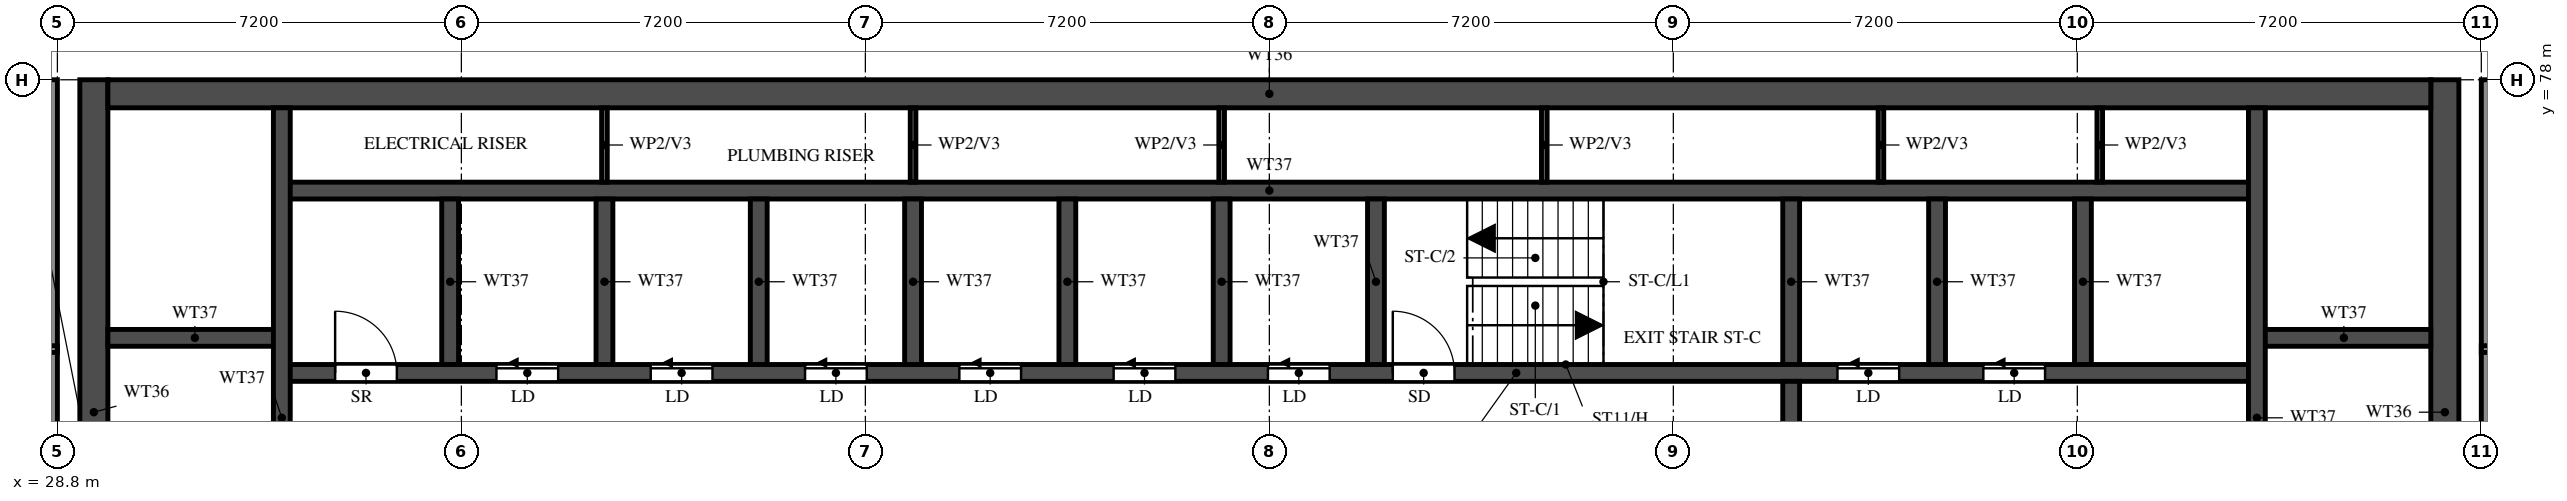
"""IFC4 building model, lengths in metres.
Left out: names, types, materials, properties, quantities, classifications, styles, units other than length and angle.
Written with IfcOpenShell. Run it as: python <this file> out.ifc"""

import sys

from ifc_helpers import new_model, si_unit, direction, frame, frame_2d, origin, place, context, subcontext, project, spatial, rectangle, extrude, element, fill, save


model = new_model("IFC4")
c1 = context("Model", 3, precision=1e-05, world=origin(), true_north=direction((0.0, 1.0)))
c2 = subcontext(c1, "Body", "Model", "MODEL_VIEW")
j1 = project(units=[si_unit("LENGTHUNIT", "METRE"), si_unit("PLANEANGLEUNIT", "RADIAN")], contexts=[c1])
p1 = place(None, origin())
s1 = spatial("IfcSite", under=j1, at=p1, CompositionType="ELEMENT")
p2 = place(p1, origin())
s2 = spatial("IfcBuilding", under=s1, at=p2, CompositionType="ELEMENT")
p3 = place(p2, frame((0.0, 0.0, 232.5)))
s3 = spatial("IfcBuildingStorey", under=s2, at=p3, CompositionType="ELEMENT", Elevation=232.5)
for number, where, z_axis, x_axis in (
    (1, (29.45, 66.15, 0.0), (0.0, 0.0, 1.0), (0.0, 1.0, 0.0)),
    (2, (71.35, 66.15, 0.0), (0.0, 0.0, 1.0), (0.0, 1.0, 0.0)),
):
    element("IfcWall", number, at=place(p3, frame(where, z_axis=z_axis, x_axis=x_axis)), inside=s3, PredefinedType="SHEAR", context=c2, shape_type="SweptSolid", body=[
        extrude(rectangle(XDim=11.85, YDim=0.5, at=frame_2d((5.925, 0.0))), origin(), (0.0, 0.0, 1.0), 3.22),
    ])
p4 = place(p3, frame((29.7, 77.75, 0.0), z_axis=(0.0, 0.0, 1.0), x_axis=(1.0, 0.0, 0.0)))
e3 = element("IfcWall", 3, at=p4, inside=s3, PredefinedType="SHEAR", context=c2, shape_type="SweptSolid", body=[
    extrude(rectangle(XDim=41.4, YDim=0.5, at=frame_2d((20.7, 0.0))), origin(), (0.0, 0.0, 1.0), 3.22),
])
p5 = place(p3, frame((32.8, 72.775, 0.0), z_axis=(0.0, 0.0, 1.0), x_axis=(1.0, 0.0, 0.0)))
e4 = element("IfcWall", 4, at=p5, inside=s3, PredefinedType="SHEAR", context=c2, shape_type="SweptSolid", body=[
    extrude(rectangle(XDim=35.2, YDim=0.3, at=frame_2d((17.6, 0.0))), origin(), (0.0, 0.0, 1.0), 3.22),
])
p6 = place(p5, frame((19.8, 0.0, 0.0)))
e5 = element("IfcOpeningElement", 5, at=p6, cuts=e4, PredefinedType="OPENING", context=c2, shape_type="SweptSolid", body=[
    extrude(rectangle(XDim=1.1, YDim=2.1, at=frame_2d((0.55, 1.05))), frame((0.0, 0.16, 0.0), z_axis=(0.0, -1.0, 0.0), x_axis=(1.0, 0.0, 0.0)), (0.0, 0.0, 1.0), 0.32),
])
p7 = place(p5, frame((27.725, 0.0, 0.0)))
e6 = element("IfcOpeningElement", 6, at=p7, cuts=e4, PredefinedType="OPENING", context=c2, shape_type="SweptSolid", body=[
    extrude(rectangle(XDim=1.1, YDim=2.1, at=frame_2d((0.55, 1.05))), frame((0.0, 0.16, 0.0), z_axis=(0.0, -1.0, 0.0), x_axis=(1.0, 0.0, 0.0)), (0.0, 0.0, 1.0), 0.32),
])
p8 = place(p5, frame((30.325, 0.0, 0.0)))
e7 = element("IfcOpeningElement", 7, at=p8, cuts=e4, PredefinedType="OPENING", context=c2, shape_type="SweptSolid", body=[
    extrude(rectangle(XDim=1.1, YDim=2.1, at=frame_2d((0.55, 1.05))), frame((0.0, 0.16, 0.0), z_axis=(0.0, -1.0, 0.0), x_axis=(1.0, 0.0, 0.0)), (0.0, 0.0, 1.0), 0.32),
])
p9 = place(p5, frame((3.825, 0.0, 0.0)))
e8 = element("IfcOpeningElement", 8, at=p9, cuts=e4, PredefinedType="OPENING", context=c2, shape_type="SweptSolid", body=[
    extrude(rectangle(XDim=1.1, YDim=2.1, at=frame_2d((0.55, 1.05))), frame((0.0, 0.16, 0.0), z_axis=(0.0, -1.0, 0.0), x_axis=(1.0, 0.0, 0.0)), (0.0, 0.0, 1.0), 0.32),
])
p10 = place(p5, frame((6.575, 0.0, 0.0)))
e9 = element("IfcOpeningElement", 9, at=p10, cuts=e4, PredefinedType="OPENING", context=c2, shape_type="SweptSolid", body=[
    extrude(rectangle(XDim=1.1, YDim=2.1, at=frame_2d((0.55, 1.05))), frame((0.0, 0.16, 0.0), z_axis=(0.0, -1.0, 0.0), x_axis=(1.0, 0.0, 0.0)), (0.0, 0.0, 1.0), 0.32),
])
p11 = place(p5, frame((9.325, 0.0, 0.0)))
e10 = element("IfcOpeningElement", 10, at=p11, cuts=e4, PredefinedType="OPENING", context=c2, shape_type="SweptSolid", body=[
    extrude(rectangle(XDim=1.1, YDim=2.1, at=frame_2d((0.55, 1.05))), frame((0.0, 0.16, 0.0), z_axis=(0.0, -1.0, 0.0), x_axis=(1.0, 0.0, 0.0)), (0.0, 0.0, 1.0), 0.32),
])
p12 = place(p5, frame((12.075, 0.0, 0.0)))
e11 = element("IfcOpeningElement", 11, at=p12, cuts=e4, PredefinedType="OPENING", context=c2, shape_type="SweptSolid", body=[
    extrude(rectangle(XDim=1.1, YDim=2.1, at=frame_2d((0.55, 1.05))), frame((0.0, 0.16, 0.0), z_axis=(0.0, -1.0, 0.0), x_axis=(1.0, 0.0, 0.0)), (0.0, 0.0, 1.0), 0.32),
])
p13 = place(p5, frame((14.825, 0.0, 0.0)))
e12 = element("IfcOpeningElement", 12, at=p13, cuts=e4, PredefinedType="OPENING", context=c2, shape_type="SweptSolid", body=[
    extrude(rectangle(XDim=1.1, YDim=2.1, at=frame_2d((0.55, 1.05))), frame((0.0, 0.16, 0.0), z_axis=(0.0, -1.0, 0.0), x_axis=(1.0, 0.0, 0.0)), (0.0, 0.0, 1.0), 0.32),
])
p14 = place(p5, frame((17.575, 0.0, 0.0)))
e13 = element("IfcOpeningElement", 13, at=p14, cuts=e4, PredefinedType="OPENING", context=c2, shape_type="SweptSolid", body=[
    extrude(rectangle(XDim=1.1, YDim=2.1, at=frame_2d((0.55, 1.05))), frame((0.0, 0.16, 0.0), z_axis=(0.0, -1.0, 0.0), x_axis=(1.0, 0.0, 0.0)), (0.0, 0.0, 1.0), 0.32),
])
p15 = place(p5, frame((0.95, 0.0, 0.0)))
e14 = element("IfcOpeningElement", 14, at=p15, cuts=e4, PredefinedType="OPENING", context=c2, shape_type="SweptSolid", body=[
    extrude(rectangle(XDim=1.1, YDim=2.1, at=frame_2d((0.55, 1.05))), frame((0.0, 0.16, 0.0), z_axis=(0.0, -1.0, 0.0), x_axis=(1.0, 0.0, 0.0)), (0.0, 0.0, 1.0), 0.32),
])
p16 = place(p3, frame((32.8, 76.025, 0.0), z_axis=(0.0, 0.0, 1.0), x_axis=(1.0, 0.0, 0.0)))
e15 = element("IfcWall", 15, at=p16, inside=s3, PredefinedType="SHEAR", context=c2, shape_type="SweptSolid", body=[
    extrude(rectangle(XDim=35.2, YDim=0.3, at=frame_2d((17.6, 0.0))), origin(), (0.0, 0.0, 1.0), 3.22),
])
for number, where, z_axis, x_axis in (
    (16, (29.7, 73.4, 0.0), (0.0, 0.0, 1.0), (1.0, 0.0, 0.0)),
    (17, (68.0, 73.4, 0.0), (0.0, 0.0, 1.0), (1.0, 0.0, 0.0)),
):
    element("IfcWall", number, at=place(p3, frame(where, z_axis=z_axis, x_axis=x_axis)), inside=s3, PredefinedType="SHEAR", context=c2, shape_type="SweptSolid", body=[
        extrude(rectangle(XDim=3.1, YDim=0.3, at=frame_2d((1.55, 0.0))), origin(), (0.0, 0.0, 1.0), 3.22),
    ])
p17 = place(p3, frame((32.8, 66.45, 0.0), z_axis=(0.0, 0.0, 1.0), x_axis=(0.0, 1.0, 0.0)))
e18 = element("IfcWall", 18, at=p17, inside=s3, PredefinedType="SHEAR", context=c2, shape_type="SweptSolid", body=[
    extrude(rectangle(XDim=11.05, YDim=0.3, at=frame_2d((5.525, 0.0))), origin(), (0.0, 0.0, 1.0), 3.22),
])
p18 = place(p3, frame((68.0, 66.45, 0.0), z_axis=(0.0, 0.0, 1.0), x_axis=(0.0, 1.0, 0.0)))
e19 = element("IfcWall", 19, at=p18, inside=s3, PredefinedType="SHEAR", context=c2, shape_type="SweptSolid", body=[
    extrude(rectangle(XDim=11.05, YDim=0.3, at=frame_2d((5.525, 0.0))), origin(), (0.0, 0.0, 1.0), 3.22),
])
p19 = place(p18, frame((0.15, 0.0, 0.0)))
e20 = element("IfcOpeningElement", 20, at=p19, cuts=e19, PredefinedType="OPENING", context=c2, shape_type="SweptSolid", body=[
    extrude(rectangle(XDim=1.1, YDim=2.1, at=frame_2d((0.55, 1.05))), frame((0.0, 0.16, 0.0), z_axis=(0.0, -1.0, 0.0), x_axis=(1.0, 0.0, 0.0)), (0.0, 0.0, 1.0), 0.32),
])
p20 = place(p3, frame((59.7, 66.45, 0.0), z_axis=(0.0, 0.0, 1.0), x_axis=(0.0, 1.0, 0.0)))
e21 = element("IfcWall", 21, at=p20, inside=s3, PredefinedType="SHEAR", context=c2, shape_type="SweptSolid", body=[
    extrude(rectangle(XDim=6.175, YDim=0.3, at=frame_2d((3.087, 0.0))), origin(), (0.0, 0.0, 1.0), 3.22),
])
p21 = place(p20, frame((3.85, 0.0, 0.0)))
e22 = element("IfcOpeningElement", 22, at=p21, cuts=e21, PredefinedType="OPENING", context=c2, shape_type="SweptSolid", body=[
    extrude(rectangle(XDim=1.2, YDim=2.1, at=frame_2d((0.6, 1.05))), frame((0.0, 0.16, 0.0), z_axis=(0.0, -1.0, 0.0), x_axis=(1.0, 0.0, 0.0)), (0.0, 0.0, 1.0), 0.32),
])
for number, where, z_axis, x_axis in (
    (23, (59.7, 72.925, 0.0), (0.0, 0.0, 1.0), (0.0, 1.0, 0.0)),
    (24, (35.8, 72.925, 0.0), (0.0, 0.0, 1.0), (0.0, 1.0, 0.0)),
    (25, (38.55, 72.925, 0.0), (0.0, 0.0, 1.0), (0.0, 1.0, 0.0)),
    (26, (41.3, 72.925, 0.0), (0.0, 0.0, 1.0), (0.0, 1.0, 0.0)),
    (27, (44.05, 72.925, 0.0), (0.0, 0.0, 1.0), (0.0, 1.0, 0.0)),
    (28, (46.8, 72.925, 0.0), (0.0, 0.0, 1.0), (0.0, 1.0, 0.0)),
    (29, (49.55, 72.925, 0.0), (0.0, 0.0, 1.0), (0.0, 1.0, 0.0)),
    (30, (52.3, 72.925, 0.0), (0.0, 0.0, 1.0), (0.0, 1.0, 0.0)),
    (31, (62.3, 72.925, 0.0), (0.0, 0.0, 1.0), (0.0, 1.0, 0.0)),
    (32, (64.9, 72.925, 0.0), (0.0, 0.0, 1.0), (0.0, 1.0, 0.0)),
):
    element("IfcWall", number, at=place(p3, frame(where, z_axis=z_axis, x_axis=x_axis)), inside=s3, PredefinedType="SHEAR", context=c2, shape_type="SweptSolid", body=[
        extrude(rectangle(XDim=2.95, YDim=0.3, at=frame_2d((1.475, 0.0))), origin(), (0.0, 0.0, 1.0), 3.22),
    ])
for number, where, z_axis, x_axis in (
    (33, (38.55, 76.175, 0.0), (0.0, 0.0, 1.0), (0.0, 1.0, 0.0)),
    (34, (44.05, 76.175, 0.0), (0.0, 0.0, 1.0), (0.0, 1.0, 0.0)),
    (35, (49.55, 76.175, 0.0), (0.0, 0.0, 1.0), (0.0, 1.0, 0.0)),
    (36, (55.3, 76.175, 0.0), (0.0, 0.0, 1.0), (0.0, 1.0, 0.0)),
    (37, (61.3, 76.175, 0.0), (0.0, 0.0, 1.0), (0.0, 1.0, 0.0)),
    (38, (65.2, 76.175, 0.0), (0.0, 0.0, 1.0), (0.0, 1.0, 0.0)),
):
    element("IfcWall", number, at=place(p3, frame(where, z_axis=z_axis, x_axis=x_axis)), inside=s3, PredefinedType="PARTITIONING", context=c2, shape_type="SweptSolid", body=[
        extrude(rectangle(XDim=1.325, YDim=0.1, at=frame_2d((0.663, 0.0))), origin(), (0.0, 0.0, 1.0), 3.22),
    ])
for number, where, z_axis, x_axis in (
    (39, (28.7, 62.4, 0.0), (0.0, 0.0, 1.0), (0.0, 1.0, 0.0)),
    (40, (72.1, 62.4, 0.0), (0.0, 0.0, 1.0), (0.0, 1.0, 0.0)),
):
    element("IfcWall", number, at=place(p3, frame(where, z_axis=z_axis, x_axis=x_axis)), inside=s3, PredefinedType="SOLIDWALL", context=c2, shape_type="SweptSolid", body=[
        extrude(rectangle(XDim=15.6, YDim=0.2, at=frame_2d((7.8, 0.0))), origin(), (0.0, 0.0, 1.0), 3.22),
    ])
p22 = place(p3, frame((18.525, 73.2, 0.0), z_axis=(0.0, 0.0, 1.0), x_axis=(1.0, 0.0, 0.0)))
e41 = element("IfcWall", 41, at=p22, inside=s3, PredefinedType="PARTITIONING", context=c2, shape_type="SweptSolid", body=[
    extrude(rectangle(XDim=10.275, YDim=0.12, at=frame_2d((5.138, 0.0))), origin(), (0.0, 0.0, 1.0), 2.32),
])
p23 = place(p22, frame((5.275, 0.0, 0.0)))
e42 = element("IfcOpeningElement", 42, at=p23, cuts=e41, PredefinedType="OPENING", context=c2, shape_type="SweptSolid", body=[
    extrude(rectangle(XDim=0.9, YDim=2.1, at=frame_2d((0.45, 1.05))), frame((0.0, 0.07, 0.0), z_axis=(0.0, -1.0, 0.0), x_axis=(1.0, 0.0, 0.0)), (0.0, 0.0, 1.0), 0.14),
])
p24 = place(p3, frame((72.0, 73.2, 0.0), z_axis=(0.0, 0.0, 1.0), x_axis=(1.0, 0.0, 0.0)))
e43 = element("IfcWall", 43, at=p24, inside=s3, PredefinedType="PARTITIONING", context=c2, shape_type="SweptSolid", body=[
    extrude(rectangle(XDim=10.275, YDim=0.12, at=frame_2d((5.137, 0.0))), origin(), (0.0, 0.0, 1.0), 2.32),
])
p25 = place(p24, frame((4.1, 0.0, 0.0)))
e44 = element("IfcOpeningElement", 44, at=p25, cuts=e43, PredefinedType="OPENING", context=c2, shape_type="SweptSolid", body=[
    extrude(rectangle(XDim=0.9, YDim=2.1, at=frame_2d((0.45, 1.05))), frame((0.0, 0.07, 0.0), z_axis=(0.0, -1.0, 0.0), x_axis=(1.0, 0.0, 0.0)), (0.0, 0.0, 1.0), 0.14),
])
p26 = place(p6, origin())
e45 = element("IfcDoor", 45, at=p26, inside=s3, OperationType="SINGLE_SWING_LEFT", PredefinedType="DOOR", context=c2, shape_type="SweptSolid", body=[
    extrude(rectangle(XDim=1.1, YDim=2.1, at=frame_2d((0.55, 1.05))), frame((0.0, 0.025, 0.0), z_axis=(0.0, -1.0, 0.0), x_axis=(1.0, 0.0, 0.0)), (0.0, 0.0, 1.0), 0.05),
])
fill(e5, e45)
p27 = place(p7, origin())
e46 = element("IfcDoor", 46, at=p27, inside=s3, OperationType="SLIDING_TO_LEFT", PredefinedType="DOOR", context=c2, shape_type="SweptSolid", body=[
    extrude(rectangle(XDim=1.1, YDim=2.1, at=frame_2d((0.55, 1.05))), frame((0.0, 0.025, 0.0), z_axis=(0.0, -1.0, 0.0), x_axis=(1.0, 0.0, 0.0)), (0.0, 0.0, 1.0), 0.05),
])
fill(e6, e46)
p28 = place(p8, origin())
e47 = element("IfcDoor", 47, at=p28, inside=s3, OperationType="SLIDING_TO_LEFT", PredefinedType="DOOR", context=c2, shape_type="SweptSolid", body=[
    extrude(rectangle(XDim=1.1, YDim=2.1, at=frame_2d((0.55, 1.05))), frame((0.0, 0.025, 0.0), z_axis=(0.0, -1.0, 0.0), x_axis=(1.0, 0.0, 0.0)), (0.0, 0.0, 1.0), 0.05),
])
fill(e7, e47)
p29 = place(p9, origin())
e48 = element("IfcDoor", 48, at=p29, inside=s3, OperationType="SLIDING_TO_LEFT", PredefinedType="DOOR", context=c2, shape_type="SweptSolid", body=[
    extrude(rectangle(XDim=1.1, YDim=2.1, at=frame_2d((0.55, 1.05))), frame((0.0, 0.025, 0.0), z_axis=(0.0, -1.0, 0.0), x_axis=(1.0, 0.0, 0.0)), (0.0, 0.0, 1.0), 0.05),
])
fill(e8, e48)
p30 = place(p10, origin())
e49 = element("IfcDoor", 49, at=p30, inside=s3, OperationType="SLIDING_TO_LEFT", PredefinedType="DOOR", context=c2, shape_type="SweptSolid", body=[
    extrude(rectangle(XDim=1.1, YDim=2.1, at=frame_2d((0.55, 1.05))), frame((0.0, 0.025, 0.0), z_axis=(0.0, -1.0, 0.0), x_axis=(1.0, 0.0, 0.0)), (0.0, 0.0, 1.0), 0.05),
])
fill(e9, e49)
p31 = place(p11, origin())
e50 = element("IfcDoor", 50, at=p31, inside=s3, OperationType="SLIDING_TO_LEFT", PredefinedType="DOOR", context=c2, shape_type="SweptSolid", body=[
    extrude(rectangle(XDim=1.1, YDim=2.1, at=frame_2d((0.55, 1.05))), frame((0.0, 0.025, 0.0), z_axis=(0.0, -1.0, 0.0), x_axis=(1.0, 0.0, 0.0)), (0.0, 0.0, 1.0), 0.05),
])
fill(e10, e50)
p32 = place(p12, origin())
e51 = element("IfcDoor", 51, at=p32, inside=s3, OperationType="SLIDING_TO_LEFT", PredefinedType="DOOR", context=c2, shape_type="SweptSolid", body=[
    extrude(rectangle(XDim=1.1, YDim=2.1, at=frame_2d((0.55, 1.05))), frame((0.0, 0.025, 0.0), z_axis=(0.0, -1.0, 0.0), x_axis=(1.0, 0.0, 0.0)), (0.0, 0.0, 1.0), 0.05),
])
fill(e11, e51)
p33 = place(p13, origin())
e52 = element("IfcDoor", 52, at=p33, inside=s3, OperationType="SLIDING_TO_LEFT", PredefinedType="DOOR", context=c2, shape_type="SweptSolid", body=[
    extrude(rectangle(XDim=1.1, YDim=2.1, at=frame_2d((0.55, 1.05))), frame((0.0, 0.025, 0.0), z_axis=(0.0, -1.0, 0.0), x_axis=(1.0, 0.0, 0.0)), (0.0, 0.0, 1.0), 0.05),
])
fill(e12, e52)
p34 = place(p14, origin())
e53 = element("IfcDoor", 53, at=p34, inside=s3, OperationType="SLIDING_TO_LEFT", PredefinedType="DOOR", context=c2, shape_type="SweptSolid", body=[
    extrude(rectangle(XDim=1.1, YDim=2.1, at=frame_2d((0.55, 1.05))), frame((0.0, 0.025, 0.0), z_axis=(0.0, -1.0, 0.0), x_axis=(1.0, 0.0, 0.0)), (0.0, 0.0, 1.0), 0.05),
])
fill(e13, e53)
p35 = place(p15, origin())
e54 = element("IfcDoor", 54, at=p35, inside=s3, OperationType="SINGLE_SWING_LEFT", PredefinedType="DOOR", context=c2, shape_type="SweptSolid", body=[
    extrude(rectangle(XDim=1.1, YDim=2.1, at=frame_2d((0.55, 1.05))), frame((0.0, 0.025, 0.0), z_axis=(0.0, -1.0, 0.0), x_axis=(1.0, 0.0, 0.0)), (0.0, 0.0, 1.0), 0.05),
])
fill(e14, e54)
save(model, sys.argv[1])
